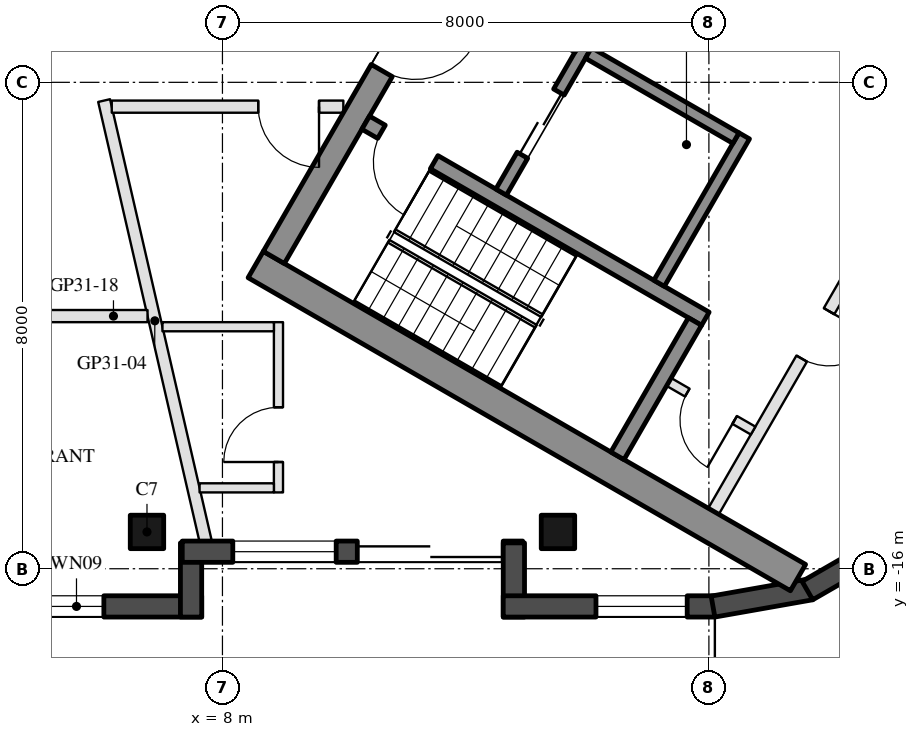
"""IFC4 building model, lengths in metres.
Left out: names, types, materials, properties, quantities, classifications, styles, units other than length and angle.
Written with IfcOpenShell. Run it as: python <this file> out.ifc"""

import sys

from ifc_helpers import new_model, si_unit, direction, frame, frame_2d, origin, origin_2d, place, context, subcontext, project, spatial, rectangle, hollow_rectangle, extrude, boolean, halfspace, element, fill, save


model = new_model("IFC4")
c1 = context("Model", 3, precision=1e-05, world=origin(), true_north=direction((0.0, 1.0)))
c2 = subcontext(c1, "Body", "Model", "MODEL_VIEW")
j1 = project(units=[si_unit("LENGTHUNIT", "METRE"), si_unit("PLANEANGLEUNIT", "RADIAN")], contexts=[c1])
p1 = place(None, origin())
s1 = spatial("IfcSite", under=j1, at=p1, CompositionType="ELEMENT")
p2 = place(p1, origin())
s2 = spatial("IfcBuilding", under=s1, at=p2, CompositionType="ELEMENT")
p3 = place(p2, frame((0.0, 0.0, 302.2)))
s3 = spatial("IfcBuildingStorey", under=s2, at=p3, CompositionType="ELEMENT", Elevation=302.2)
p4 = place(p3, frame((6.759, -15.395, 0.0), z_axis=(0.0, 0.0, 1.0), x_axis=(-1.0, 0.0, 0.0)))
e1 = element("IfcColumn", 1, at=p4, inside=s3, PredefinedType="COLUMN", context=c2, shape_type="SweptSolid", body=[
    boolean("DIFFERENCE", extrude(hollow_rectangle(XDim=0.55, YDim=0.55, WallThickness=0.025, at=origin_2d()), origin(), (0.0, 0.0, 1.0), 3.7), halfspace(frame((0.0, 0.0, 0.034), z_axis=(0.0, 0.0, 1.0), x_axis=(1.0, 0.0, 0.0)), True)),
])
p5 = place(p3, frame((13.518, -15.395, 0.0), z_axis=(0.0, 0.0, 1.0), x_axis=(-1.0, 0.0, 0.0)))
e2 = element("IfcColumn", 2, at=p5, inside=s3, PredefinedType="COLUMN", context=c2, shape_type="SweptSolid", body=[
    boolean("DIFFERENCE", extrude(hollow_rectangle(XDim=0.55, YDim=0.55, WallThickness=0.025, at=origin_2d()), origin(), (0.0, 0.0, 1.0), 3.7), halfspace(frame((0.0, 0.0, 0.04), z_axis=(0.0, 0.0, 1.0), x_axis=(1.0, 0.0, 0.0)), True)),
])
p6 = place(p3, frame((-0.9, -16.62, 0.0), z_axis=(0.0, 0.0, 1.0), x_axis=(1.0, 0.0, 0.0)))
e3 = element("IfcWall", 3, at=p6, inside=s3, PredefinedType="SOLIDWALL", context=c2, shape_type="SweptSolid", body=[
    extrude(rectangle(XDim=8.559, YDim=0.35, at=frame_2d((4.279, 0.0))), origin(), (0.0, 0.0, 1.0), 3.55),
])
p7 = place(p6, frame((1.525, 0.0, 0.3)))
e4 = element("IfcOpeningElement", 4, at=p7, cuts=e3, PredefinedType="OPENING", context=c2, shape_type="SweptSolid", body=[
    extrude(rectangle(XDim=0.9, YDim=2.65, at=frame_2d((0.45, 1.325))), frame((0.0, 0.185, 0.0), z_axis=(0.0, -1.0, 0.0), x_axis=(1.0, 0.0, 0.0)), (0.0, 0.0, 1.0), 0.37),
])
p8 = place(p6, frame((3.35, 0.0, 0.0)))
e5 = element("IfcOpeningElement", 5, at=p8, cuts=e3, PredefinedType="OPENING", context=c2, shape_type="SweptSolid", body=[
    extrude(rectangle(XDim=2.4, YDim=2.4, at=frame_2d((1.2, 1.2))), frame((0.0, 0.185, 0.0), z_axis=(0.0, -1.0, 0.0), x_axis=(1.0, 0.0, 0.0)), (0.0, 0.0, 1.0), 0.37),
])
p9 = place(p6, frame((6.05, 0.0, 0.3)))
e6 = element("IfcOpeningElement", 6, at=p9, cuts=e3, PredefinedType="OPENING", context=c2, shape_type="SweptSolid", body=[
    extrude(rectangle(XDim=0.9, YDim=2.65, at=frame_2d((0.45, 1.325))), frame((0.0, 0.185, 0.0), z_axis=(0.0, -1.0, 0.0), x_axis=(1.0, 0.0, 0.0)), (0.0, 0.0, 1.0), 0.37),
])
p10 = place(p3, frame((7.484, -16.795, 0.0), z_axis=(0.0, 0.0, 1.0), x_axis=(0.0, 1.0, 0.0)))
e7 = element("IfcWall", 7, at=p10, inside=s3, PredefinedType="SOLIDWALL", context=c2, shape_type="SweptSolid", body=[
    extrude(rectangle(XDim=1.22, YDim=0.35, at=frame_2d((0.61, 0.0))), origin(), (0.0, 0.0, 1.0), 3.55),
])
p11 = place(p3, frame((7.339, -15.719, 0.0), z_axis=(0.0, 0.0, 1.0), x_axis=(1.0, 0.0, 0.0)))
e8 = element("IfcWall", 8, at=p11, inside=s3, PredefinedType="SOLIDWALL", context=c2, shape_type="SweptSolid", body=[
    extrude(rectangle(XDim=5.599, YDim=0.35, at=frame_2d((2.799, 0.0))), origin(), (0.0, 0.0, 1.0), 3.55),
])
p12 = place(p11, frame((2.879, 0.0, 0.0)))
e9 = element("IfcOpeningElement", 9, at=p12, cuts=e8, PredefinedType="OPENING", context=c2, shape_type="SweptSolid", body=[
    extrude(rectangle(XDim=2.4, YDim=2.4, at=frame_2d((1.2, 1.2))), frame((0.0, 0.185, 0.0), z_axis=(0.0, -1.0, 0.0), x_axis=(1.0, 0.0, 0.0)), (0.0, 0.0, 1.0), 0.37),
])
p13 = place(p11, frame((0.831, 0.0, 0.3)))
e10 = element("IfcOpeningElement", 10, at=p13, cuts=e8, PredefinedType="OPENING", context=c2, shape_type="SweptSolid", body=[
    extrude(rectangle(XDim=1.7, YDim=2.65, at=frame_2d((0.85, 1.325))), frame((0.0, 0.185, 0.0), z_axis=(0.0, -1.0, 0.0), x_axis=(1.0, 0.0, 0.0)), (0.0, 0.0, 1.0), 0.37),
])
p14 = place(p3, frame((12.793, -15.575, 0.0), z_axis=(0.0, 0.0, 1.0), x_axis=(0.0, -1.0, 0.0)))
e11 = element("IfcWall", 11, at=p14, inside=s3, PredefinedType="SOLIDWALL", context=c2, shape_type="SweptSolid", body=[
    extrude(rectangle(XDim=1.22, YDim=0.35, at=frame_2d((0.61, 0.0))), origin(), (0.0, 0.0, 1.0), 3.55),
])
p15 = place(p3, frame((12.618, -16.62, 0.0), z_axis=(0.0, 0.0, 1.0), x_axis=(1.0, 0.0, 0.0)))
e12 = element("IfcWall", 12, at=p15, inside=s3, PredefinedType="SOLIDWALL", context=c2, shape_type="SweptSolid", body=[
    extrude(rectangle(XDim=3.48, YDim=0.35, at=frame_2d((1.74, 0.0))), origin(), (0.0, 0.0, 1.0), 3.55),
])
p16 = place(p15, frame((1.525, 0.0, 0.3)))
e13 = element("IfcOpeningElement", 13, at=p16, cuts=e12, PredefinedType="OPENING", context=c2, shape_type="SweptSolid", body=[
    extrude(rectangle(XDim=1.5, YDim=2.65, at=frame_2d((0.75, 1.325))), frame((0.0, 0.185, 0.0), z_axis=(0.0, -1.0, 0.0), x_axis=(1.0, 0.0, 0.0)), (0.0, 0.0, 1.0), 0.37),
])
p17 = place(p3, frame((16.068, -16.622, 0.0), z_axis=(0.0, 0.0, 1.0), x_axis=(0.98479107762, 0.173742721977, 0.0)))
e14 = element("IfcWall", 14, at=p17, inside=s3, PredefinedType="SOLIDWALL", context=c2, shape_type="SweptSolid", body=[
    extrude(rectangle(XDim=1.634, YDim=0.35, at=frame_2d((0.817, 0.0))), origin(), (0.0, 0.0, 1.0), 3.55),
])
p18 = place(p3, frame((17.62, -16.359, 0.0), z_axis=(0.0, 0.0, 1.0), x_axis=(0.866083589932, 0.499899205091, 0.0)))
e15 = element("IfcWall", 15, at=p18, inside=s3, PredefinedType="SOLIDWALL", context=c2, shape_type="SweptSolid", body=[
    extrude(rectangle(XDim=1.634, YDim=0.35, at=frame_2d((0.817, 0.0))), origin(), (0.0, 0.0, 1.0), 3.55),
])
p19 = place(p3, frame((8.547, -10.997, 0.0), z_axis=(0.0, 0.0, 1.0), x_axis=(0.866027279078, -0.499996751883, 0.0)))
e16 = element("IfcWall", 16, at=p19, inside=s3, PredefinedType="SHEAR", context=c2, shape_type="SweptSolid", body=[
    extrude(rectangle(XDim=10.298, YDim=0.5, at=frame_2d((5.149, 0.0))), origin(), (0.0, 0.0, 1.0), 3.5),
])
p20 = place(p3, frame((8.845, -10.88, 0.0), z_axis=(0.0, 0.0, 1.0), x_axis=(0.500004234368, 0.866022959057, 0.0)))
e17 = element("IfcWall", 17, at=p20, inside=s3, PredefinedType="SHEAR", context=c2, shape_type="SweptSolid", body=[
    extrude(rectangle(XDim=10.0, YDim=0.4, at=frame_2d((5.0, 0.0))), origin(), (0.0, 0.0, 1.0), 3.5),
])
p21 = place(p20, frame((3.55, 0.0, 0.0)))
e18 = element("IfcOpeningElement", 18, at=p21, cuts=e17, PredefinedType="OPENING", context=c2, shape_type="SweptSolid", body=[
    extrude(rectangle(XDim=1.1, YDim=2.1, at=frame_2d((0.55, 1.05))), frame((0.0, 0.21, 0.0), z_axis=(0.0, -1.0, 0.0), x_axis=(1.0, 0.0, 0.0)), (0.0, 0.0, 1.0), 0.42),
])
p22 = place(p20, frame((5.85, 0.0, 0.0)))
e19 = element("IfcOpeningElement", 19, at=p22, cuts=e17, PredefinedType="OPENING", context=c2, shape_type="SweptSolid", body=[
    extrude(rectangle(XDim=1.4, YDim=2.1, at=frame_2d((0.7, 1.05))), frame((0.0, 0.21, 0.0), z_axis=(0.0, -1.0, 0.0), x_axis=(1.0, 0.0, 0.0)), (0.0, 0.0, 1.0), 0.42),
])
p23 = place(p3, frame((10.356, -8.664, 0.0), z_axis=(0.0, 0.0, 1.0), x_axis=(0.866028629588, -0.499994412703, 0.0)))
e20 = element("IfcWall", 20, at=p23, inside=s3, PredefinedType="SHEAR", context=c2, shape_type="SweptSolid", body=[
    extrude(rectangle(XDim=6.45, YDim=0.25, at=frame_2d((3.225, 0.0))), origin(), (0.0, 0.0, 1.0), 3.5),
])
p24 = place(p23, frame((0.3, 0.0, 0.0)))
e21 = element("IfcOpeningElement", 21, at=p24, cuts=e20, PredefinedType="OPENING", context=c2, shape_type="SweptSolid", body=[
    extrude(rectangle(XDim=1.0, YDim=2.1, at=frame_2d((0.5, 1.05))), frame((0.0, 0.135, 0.0), z_axis=(0.0, -1.0, 0.0), x_axis=(1.0, 0.0, 0.0)), (0.0, 0.0, 1.0), 0.27),
])
p25 = place(p3, frame((14.496, -14.143, 0.0), z_axis=(0.0, 0.0, 1.0), x_axis=(0.500062241894, 0.865989465428, 0.0)))
e22 = element("IfcWall", 22, at=p25, inside=s3, PredefinedType="SHEAR", context=c2, shape_type="SweptSolid", body=[
    extrude(rectangle(XDim=2.55, YDim=0.25, at=frame_2d((1.275, 0.0))), origin(), (0.0, 0.0, 1.0), 3.5),
])
p26 = place(p3, frame((15.181, -11.305, 0.0), z_axis=(0.0, 0.0, 1.0), x_axis=(0.49994636267, 0.866056369097, 0.0)))
e23 = element("IfcWall", 23, at=p26, inside=s3, PredefinedType="SHEAR", context=c2, shape_type="SweptSolid", body=[
    extrude(rectangle(XDim=2.8, YDim=0.2, at=frame_2d((1.4, 0.0))), origin(), (0.0, 0.0, 1.0), 3.5),
])
p27 = place(p3, frame((12.583, -9.805, 0.0), z_axis=(0.0, 0.0, 1.0), x_axis=(0.49994636267, 0.866056369097, 0.0)))
e24 = element("IfcWall", 24, at=p27, inside=s3, PredefinedType="SHEAR", context=c2, shape_type="SweptSolid", body=[
    extrude(rectangle(XDim=2.8, YDim=0.2, at=frame_2d((1.4, 0.0))), origin(), (0.0, 0.0, 1.0), 3.5),
])
p28 = place(p27, frame((0.7, 0.0, 0.0)))
e25 = element("IfcOpeningElement", 25, at=p28, cuts=e24, PredefinedType="OPENING", context=c2, shape_type="SweptSolid", body=[
    extrude(rectangle(XDim=1.2, YDim=2.1, at=frame_2d((0.6, 1.05))), frame((0.0, 0.11, 0.0), z_axis=(0.0, -1.0, 0.0), x_axis=(1.0, 0.0, 0.0)), (0.0, 0.0, 1.0), 0.22),
])
p29 = place(p3, frame((11.768, -6.217, 0.0), z_axis=(0.0, 0.0, 1.0), x_axis=(0.866050077142, -0.499957262057, 0.0)))
e26 = element("IfcWall", 26, at=p29, inside=s3, PredefinedType="SHEAR", context=c2, shape_type="SweptSolid", body=[
    extrude(rectangle(XDim=2.4, YDim=0.2, at=frame_2d((1.2, 0.0))), origin(), (0.0, 0.0, 1.0), 3.5),
])
p30 = place(p3, frame((14.02, -7.517, 0.0), z_axis=(0.0, 0.0, 1.0), x_axis=(0.866034573852, -0.49998411664, 0.0)))
e27 = element("IfcWall", 27, at=p30, inside=s3, PredefinedType="SHEAR", context=c2, shape_type="SweptSolid", body=[
    extrude(rectangle(XDim=2.8, YDim=0.2, at=frame_2d((1.4, 0.0))), origin(), (0.0, 0.0, 1.0), 3.5),
])
p31 = place(p3, frame((12.968, -4.138, 0.0), z_axis=(0.0, 0.0, 1.0), x_axis=(0.866028328073, -0.49999493495, 0.0)))
e28 = element("IfcWall", 28, at=p31, inside=s3, PredefinedType="SHEAR", context=c2, shape_type="SweptSolid", body=[
    extrude(rectangle(XDim=10.16, YDim=0.2, at=frame_2d((5.08, 0.0))), origin(), (0.0, 0.0, 1.0), 3.5),
])
p32 = place(p31, frame((0.62, 0.0, 0.0)))
e29 = element("IfcOpeningElement", 29, at=p32, cuts=e28, PredefinedType="OPENING", context=c2, shape_type="SweptSolid", body=[
    extrude(rectangle(XDim=1.1, YDim=2.1, at=frame_2d((0.55, 1.05))), frame((0.0, 0.11, 0.0), z_axis=(0.0, -1.0, 0.0), x_axis=(1.0, 0.0, 0.0)), (0.0, 0.0, 1.0), 0.22),
])
p33 = place(p31, frame((5.8, 0.0, 0.0)))
e30 = element("IfcOpeningElement", 30, at=p33, cuts=e28, PredefinedType="OPENING", context=c2, shape_type="SweptSolid", body=[
    extrude(rectangle(XDim=0.9, YDim=2.1, at=frame_2d((0.45, 1.05))), frame((0.0, 0.11, 0.0), z_axis=(0.0, -1.0, 0.0), x_axis=(1.0, 0.0, 0.0)), (0.0, 0.0, 1.0), 0.22),
])
p34 = place(p3, frame((16.076, -15.055, 0.0), z_axis=(0.0, 0.0, 1.0), x_axis=(0.499995103361, 0.866028230842, 0.0)))
e31 = element("IfcWall", 31, at=p34, inside=s3, PredefinedType="PARTITIONING", context=c2, shape_type="SweptSolid", body=[
    extrude(rectangle(XDim=5.4, YDim=0.2, at=frame_2d((2.7, 0.0))), origin(), (0.0, 0.0, 1.0), 3.5),
])
p35 = place(p34, frame((2.9, 0.0, 0.0)))
e32 = element("IfcOpeningElement", 32, at=p35, cuts=e31, PredefinedType="OPENING", context=c2, shape_type="SweptSolid", body=[
    extrude(rectangle(XDim=0.9, YDim=2.1, at=frame_2d((0.45, 1.05))), frame((0.0, 0.11, 0.0), z_axis=(0.0, -1.0, 0.0), x_axis=(1.0, 0.0, 0.0)), (0.0, 0.0, 1.0), 0.22),
])
p36 = place(p3, frame((15.342, -12.928, 0.0), z_axis=(0.0, 0.0, 1.0), x_axis=(0.865989903783, -0.500061482766, 0.0)))
e33 = element("IfcWall", 33, at=p36, inside=s3, PredefinedType="PARTITIONING", context=c2, shape_type="SweptSolid", body=[
    extrude(rectangle(XDim=1.6, YDim=0.15, at=frame_2d((0.8, 0.0))), origin(), (0.0, 0.0, 1.0), 3.5),
])
p37 = place(p36, frame((0.35, 0.0, 0.0)))
e34 = element("IfcOpeningElement", 34, at=p37, cuts=e33, PredefinedType="OPENING", context=c2, shape_type="SweptSolid", body=[
    extrude(rectangle(XDim=0.9, YDim=2.1, at=frame_2d((0.45, 1.05))), frame((0.0, 0.085, 0.0), z_axis=(0.0, -1.0, 0.0), x_axis=(1.0, 0.0, 0.0)), (0.0, 0.0, 1.0), 0.17),
])
p38 = place(p3, frame((7.723, -15.545, 0.0), z_axis=(0.0, 0.0, 1.0), x_axis=(-0.224458954761, 0.974483544052, 0.0)))
e35 = element("IfcWall", 35, at=p38, inside=s3, PredefinedType="PARTITIONING", context=c2, shape_type="SweptSolid", body=[
    extrude(rectangle(XDim=7.434, YDim=0.2, at=frame_2d((3.717, 0.0))), origin(), (0.0, 0.0, 1.0), 3.1),
])
p39 = place(p3, frame((6.768, -11.844, 0.0), z_axis=(0.0, 0.0, 1.0), x_axis=(-1.0, 0.0, 0.0)))
e36 = element("IfcWall", 36, at=p39, inside=s3, PredefinedType="PARTITIONING", context=c2, shape_type="SweptSolid", body=[
    extrude(rectangle(XDim=4.668, YDim=0.2, at=frame_2d((2.334, 0.0))), origin(), (0.0, 0.0, 1.0), 3.1),
])
p40 = place(p39, frame((1.834, 0.0, 0.0)))
e37 = element("IfcOpeningElement", 37, at=p40, cuts=e36, PredefinedType="OPENING", context=c2, shape_type="SweptSolid", body=[
    extrude(rectangle(XDim=1.0, YDim=2.1, at=frame_2d((0.5, 1.05))), frame((0.0, 0.11, 0.0), z_axis=(0.0, -1.0, 0.0), x_axis=(1.0, 0.0, 0.0)), (0.0, 0.0, 1.0), 0.22),
])
p41 = place(p3, frame((9.988, -8.4, 0.0), z_axis=(0.0, 0.0, 1.0), x_axis=(-1.0, 0.0, 0.0)))
e38 = element("IfcWall", 38, at=p41, inside=s3, PredefinedType="PARTITIONING", context=c2, shape_type="SweptSolid", body=[
    extrude(rectangle(XDim=3.809, YDim=0.2, at=frame_2d((1.904, 0.0))), origin(), (0.0, 0.0, 1.0), 3.1),
])
p42 = place(p41, frame((0.4, 0.0, 0.0)))
e39 = element("IfcOpeningElement", 39, at=p42, cuts=e38, PredefinedType="OPENING", context=c2, shape_type="SweptSolid", body=[
    extrude(rectangle(XDim=1.0, YDim=2.1, at=frame_2d((0.5, 1.05))), frame((0.0, 0.11, 0.0), z_axis=(0.0, -1.0, 0.0), x_axis=(1.0, 0.0, 0.0)), (0.0, 0.0, 1.0), 0.22),
])
p43 = place(p3, frame((8.921, -14.745, 0.0), z_axis=(0.0, 0.0, 1.0), x_axis=(0.0, 1.0, 0.0)))
e40 = element("IfcWall", 40, at=p43, inside=s3, PredefinedType="PARTITIONING", context=c2, shape_type="SweptSolid", body=[
    extrude(rectangle(XDim=2.8, YDim=0.15, at=frame_2d((1.4, 0.0))), origin(), (0.0, 0.0, 1.0), 3.55),
])
p44 = place(p43, frame((0.5, 0.0, 0.0)))
e41 = element("IfcOpeningElement", 41, at=p44, cuts=e40, PredefinedType="OPENING", context=c2, shape_type="SweptSolid", body=[
    extrude(rectangle(XDim=0.9, YDim=2.1, at=frame_2d((0.45, 1.05))), frame((0.0, 0.085, 0.0), z_axis=(0.0, -1.0, 0.0), x_axis=(1.0, 0.0, 0.0)), (0.0, 0.0, 1.0), 0.17),
])
p45 = place(p3, frame((7.624, -14.67, 0.0), z_axis=(0.0, 0.0, 1.0), x_axis=(1.0, 0.0, 0.0)))
e42 = element("IfcWall", 42, at=p45, inside=s3, PredefinedType="PARTITIONING", context=c2, shape_type="SweptSolid", body=[
    extrude(rectangle(XDim=1.222, YDim=0.15, at=frame_2d((0.611, 0.0))), origin(), (0.0, 0.0, 1.0), 3.55),
])
p46 = place(p3, frame((7.013, -12.02, 0.0), z_axis=(0.0, 0.0, 1.0), x_axis=(1.0, 0.0, 0.0)))
e43 = element("IfcWall", 43, at=p46, inside=s3, PredefinedType="PARTITIONING", context=c2, shape_type="SweptSolid", body=[
    extrude(rectangle(XDim=1.833, YDim=0.15, at=frame_2d((0.917, 0.0))), origin(), (0.0, 0.0, 1.0), 3.55),
])
p47 = place(p9, origin())
e44 = element("IfcWindow", 44, at=p47, inside=s3, PartitioningType="SINGLE_PANEL", PredefinedType="WINDOW", context=c2, shape_type="SweptSolid", body=[
    extrude(rectangle(XDim=0.9, YDim=2.65, at=frame_2d((0.45, 1.325))), frame((0.0, 0.03, 0.0), z_axis=(0.0, -1.0, 0.0), x_axis=(1.0, 0.0, 0.0)), (0.0, 0.0, 1.0), 0.06),
])
fill(e6, e44)
p48 = place(p12, frame((2.4, 0.0, 0.0), z_axis=(0.0, 0.0, 1.0), x_axis=(-1.0, 0.0, 0.0)))
e45 = element("IfcDoor", 45, at=p48, inside=s3, OperationType="SLIDING_TO_LEFT", PredefinedType="DOOR", context=c2, shape_type="SweptSolid", body=[
    extrude(rectangle(XDim=2.4, YDim=2.4, at=frame_2d((1.2, 1.2))), frame((0.0, 0.025, 0.0), z_axis=(0.0, -1.0, 0.0), x_axis=(1.0, 0.0, 0.0)), (0.0, 0.0, 1.0), 0.05),
])
fill(e9, e45)
p49 = place(p13, origin())
e46 = element("IfcWindow", 46, at=p49, inside=s3, PartitioningType="SINGLE_PANEL", PredefinedType="WINDOW", context=c2, shape_type="SweptSolid", body=[
    extrude(rectangle(XDim=1.7, YDim=2.65, at=frame_2d((0.85, 1.325))), frame((0.0, 0.03, 0.0), z_axis=(0.0, -1.0, 0.0), x_axis=(1.0, 0.0, 0.0)), (0.0, 0.0, 1.0), 0.06),
])
fill(e10, e46)
p50 = place(p16, origin())
e47 = element("IfcWindow", 47, at=p50, inside=s3, PartitioningType="SINGLE_PANEL", PredefinedType="WINDOW", context=c2, shape_type="SweptSolid", body=[
    extrude(rectangle(XDim=1.5, YDim=2.65, at=frame_2d((0.75, 1.325))), frame((0.0, 0.03, 0.0), z_axis=(0.0, -1.0, 0.0), x_axis=(1.0, 0.0, 0.0)), (0.0, 0.0, 1.0), 0.06),
])
fill(e13, e47)
p51 = place(p28, origin())
e48 = element("IfcDoor", 48, at=p51, inside=s3, OperationType="DOUBLE_DOOR_SLIDING", PredefinedType="DOOR", context=c2, shape_type="SweptSolid", body=[
    extrude(rectangle(XDim=1.2, YDim=2.1, at=frame_2d((0.6, 1.05))), frame((0.0, 0.025, 0.0), z_axis=(0.0, -1.0, 0.0), x_axis=(1.0, 0.0, 0.0)), (0.0, 0.0, 1.0), 0.05),
])
fill(e25, e48)
p52 = place(p37, frame((0.9, 0.0, 0.0), z_axis=(0.0, 0.0, 1.0), x_axis=(-1.0, 0.0, 0.0)))
e49 = element("IfcDoor", 49, at=p52, inside=s3, OperationType="SINGLE_SWING_LEFT", PredefinedType="DOOR", context=c2, shape_type="SweptSolid", body=[
    extrude(rectangle(XDim=0.9, YDim=2.1, at=frame_2d((0.45, 1.05))), frame((0.0, 0.025, 0.0), z_axis=(0.0, -1.0, 0.0), x_axis=(1.0, 0.0, 0.0)), (0.0, 0.0, 1.0), 0.05),
])
fill(e34, e49)
p53 = place(p33, origin())
e50 = element("IfcDoor", 50, at=p53, inside=s3, OperationType="SINGLE_SWING_LEFT", PredefinedType="DOOR", context=c2, shape_type="SweptSolid", body=[
    extrude(rectangle(XDim=0.9, YDim=2.1, at=frame_2d((0.45, 1.05))), frame((0.0, 0.025, 0.0), z_axis=(0.0, -1.0, 0.0), x_axis=(1.0, 0.0, 0.0)), (0.0, 0.0, 1.0), 0.05),
])
fill(e30, e50)
p54 = place(p35, frame((0.9, 0.0, 0.0), z_axis=(0.0, 0.0, 1.0), x_axis=(-1.0, 0.0, 0.0)))
e51 = element("IfcDoor", 51, at=p54, inside=s3, OperationType="SINGLE_SWING_LEFT", PredefinedType="DOOR", context=c2, shape_type="SweptSolid", body=[
    extrude(rectangle(XDim=0.9, YDim=2.1, at=frame_2d((0.45, 1.05))), frame((0.0, 0.025, 0.0), z_axis=(0.0, -1.0, 0.0), x_axis=(1.0, 0.0, 0.0)), (0.0, 0.0, 1.0), 0.05),
])
fill(e32, e51)
p55 = place(p21, frame((1.1, 0.0, 0.0), z_axis=(0.0, 0.0, 1.0), x_axis=(-1.0, 0.0, 0.0)))
e52 = element("IfcDoor", 52, at=p55, inside=s3, OperationType="SINGLE_SWING_LEFT", PredefinedType="DOOR", context=c2, shape_type="SweptSolid", body=[
    extrude(rectangle(XDim=1.1, YDim=2.1, at=frame_2d((0.55, 1.05))), frame((0.0, 0.025, 0.0), z_axis=(0.0, -1.0, 0.0), x_axis=(1.0, 0.0, 0.0)), (0.0, 0.0, 1.0), 0.05),
])
fill(e18, e52)
p56 = place(p24, frame((1.0, 0.0, 0.0), z_axis=(0.0, 0.0, 1.0), x_axis=(-1.0, 0.0, 0.0)))
e53 = element("IfcDoor", 53, at=p56, inside=s3, OperationType="SINGLE_SWING_LEFT", PredefinedType="DOOR", context=c2, shape_type="SweptSolid", body=[
    extrude(rectangle(XDim=1.0, YDim=2.1, at=frame_2d((0.5, 1.05))), frame((0.0, 0.025, 0.0), z_axis=(0.0, -1.0, 0.0), x_axis=(1.0, 0.0, 0.0)), (0.0, 0.0, 1.0), 0.05),
])
fill(e21, e53)
p57 = place(p44, origin())
e54 = element("IfcDoor", 54, at=p57, inside=s3, OperationType="SINGLE_SWING_LEFT", PredefinedType="DOOR", context=c2, shape_type="SweptSolid", body=[
    extrude(rectangle(XDim=0.9, YDim=2.1, at=frame_2d((0.45, 1.05))), frame((0.0, 0.025, 0.0), z_axis=(0.0, -1.0, 0.0), x_axis=(1.0, 0.0, 0.0)), (0.0, 0.0, 1.0), 0.05),
])
fill(e41, e54)
p58 = place(p42, origin())
e55 = element("IfcDoor", 55, at=p58, inside=s3, OperationType="SINGLE_SWING_LEFT", PredefinedType="DOOR", context=c2, shape_type="SweptSolid", body=[
    extrude(rectangle(XDim=1.0, YDim=2.1, at=frame_2d((0.5, 1.05))), frame((0.0, 0.025, 0.0), z_axis=(0.0, -1.0, 0.0), x_axis=(1.0, 0.0, 0.0)), (0.0, 0.0, 1.0), 0.05),
])
fill(e39, e55)
save(model, sys.argv[1])
